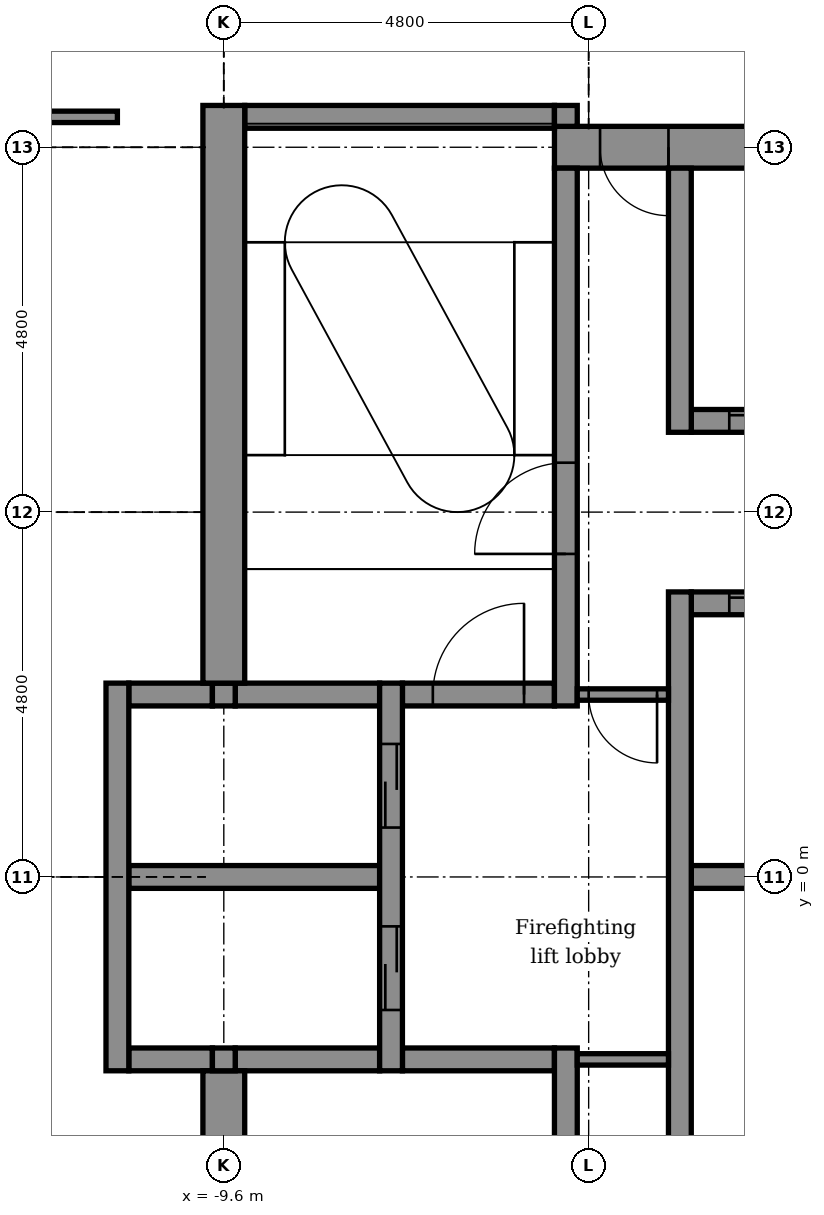
"""IFC4 building model, lengths in metres.
Left out: names, types, materials, properties, quantities, classifications, styles, units other than length and angle.
Written with IfcOpenShell. Run it as: python <this file> out.ifc"""

import sys

from ifc_helpers import new_model, si_unit, direction, frame, frame_2d, origin, place, context, subcontext, project, spatial, rectangle, extrude, element, fill, save


model = new_model("IFC4")
c1 = context("Model", 3, precision=1e-05, world=origin(), true_north=direction((0.0, 1.0)))
c2 = subcontext(c1, "Body", "Model", "MODEL_VIEW")
j1 = project(units=[si_unit("LENGTHUNIT", "METRE"), si_unit("PLANEANGLEUNIT", "RADIAN")], contexts=[c1])
p1 = place(None, origin())
s1 = spatial("IfcSite", under=j1, at=p1, CompositionType="ELEMENT")
p2 = place(p1, origin())
s2 = spatial("IfcBuilding", under=s1, at=p2, CompositionType="ELEMENT")
p3 = place(p2, frame((0.0, 0.0, 226.7)))
s3 = spatial("IfcBuildingStorey", under=s2, at=p3, CompositionType="ELEMENT", Elevation=226.7)
p4 = place(p3, frame((-10.85, -2.4, -0.15), z_axis=(0.0, 0.0, 1.0), x_axis=(1.0, 0.0, 0.0)))
e1 = element("IfcWall", 1, at=p4, inside=s3, PredefinedType="STANDARD", context=c2, shape_type="SweptSolid", body=[
    extrude(rectangle(XDim=1.1, YDim=0.3, at=frame_2d((0.55, 0.0))), origin(), (0.0, 0.0, 1.0), 3.9),
])
p5 = place(p3, frame((-9.45, -2.4, -0.15), z_axis=(0.0, 0.0, 1.0), x_axis=(1.0, 0.0, 0.0)))
e2 = element("IfcWall", 2, at=p5, inside=s3, PredefinedType="STANDARD", context=c2, shape_type="SweptSolid", body=[
    extrude(rectangle(XDim=1.9, YDim=0.3, at=frame_2d((0.95, 0.0))), origin(), (0.0, 0.0, 1.0), 3.9),
])
p6 = place(p3, frame((-7.25, -2.4, -0.15), z_axis=(0.0, 0.0, 1.0), x_axis=(1.0, 0.0, 0.0)))
e3 = element("IfcWall", 3, at=p6, inside=s3, PredefinedType="STANDARD", context=c2, shape_type="SweptSolid", body=[
    extrude(rectangle(XDim=2.0, YDim=0.3, at=frame_2d((1.0, 0.0))), origin(), (0.0, 0.0, 1.0), 3.9),
])
p7 = place(p3, frame((-10.85, 0.0, -0.15), z_axis=(0.0, 0.0, 1.0), x_axis=(1.0, 0.0, 0.0)))
e4 = element("IfcWall", 4, at=p7, inside=s3, PredefinedType="STANDARD", context=c2, shape_type="SweptSolid", body=[
    extrude(rectangle(XDim=3.3, YDim=0.3, at=frame_2d((1.65, 0.0))), origin(), (0.0, 0.0, 1.0), 3.9),
])
p8 = place(p3, frame((-3.45, 0.0, -0.15), z_axis=(0.0, 0.0, 1.0), x_axis=(1.0, 0.0, 0.0)))
e5 = element("IfcWall", 5, at=p8, inside=s3, PredefinedType="STANDARD", context=c2, shape_type="SweptSolid", body=[
    extrude(rectangle(XDim=2.1, YDim=0.3, at=frame_2d((1.05, 0.0))), origin(), (0.0, 0.0, 1.0), 3.9),
])
p9 = place(p3, frame((-10.85, 2.4, -0.15), z_axis=(0.0, 0.0, 1.0), x_axis=(1.0, 0.0, 0.0)))
e6 = element("IfcWall", 6, at=p9, inside=s3, PredefinedType="STANDARD", context=c2, shape_type="SweptSolid", body=[
    extrude(rectangle(XDim=1.1, YDim=0.3, at=frame_2d((0.55, 0.0))), origin(), (0.0, 0.0, 1.0), 3.9),
])
p10 = place(p3, frame((-9.45, 2.4, -0.15), z_axis=(0.0, 0.0, 1.0), x_axis=(1.0, 0.0, 0.0)))
e7 = element("IfcWall", 7, at=p10, inside=s3, PredefinedType="STANDARD", context=c2, shape_type="SweptSolid", body=[
    extrude(rectangle(XDim=1.9, YDim=0.3, at=frame_2d((0.95, 0.0))), origin(), (0.0, 0.0, 1.0), 3.9),
])
p11 = place(p3, frame((-7.25, 2.4, -0.15), z_axis=(0.0, 0.0, 1.0), x_axis=(1.0, 0.0, 0.0)))
e8 = element("IfcWall", 8, at=p11, inside=s3, PredefinedType="STANDARD", context=c2, shape_type="SweptSolid", body=[
    extrude(rectangle(XDim=2.0, YDim=0.3, at=frame_2d((1.0, 0.0))), origin(), (0.0, 0.0, 1.0), 3.9),
])
p12 = place(p11, frame((0.4, 0.0, 0.15)))
e9 = element("IfcOpeningElement", 9, at=p12, cuts=e8, PredefinedType="OPENING", context=c2, shape_type="SweptSolid", body=[
    extrude(rectangle(XDim=1.2, YDim=2.1, at=frame_2d((0.6, 1.05))), frame((0.0, 0.16, 0.0), z_axis=(0.0, -1.0, 0.0), x_axis=(1.0, 0.0, 0.0)), (0.0, 0.0, 1.0), 0.32),
])
p13 = place(p3, frame((-3.45, 3.6, -0.15), z_axis=(0.0, 0.0, 1.0), x_axis=(1.0, 0.0, 0.0)))
e10 = element("IfcWall", 10, at=p13, inside=s3, PredefinedType="STANDARD", context=c2, shape_type="SweptSolid", body=[
    extrude(rectangle(XDim=2.1, YDim=0.3, at=frame_2d((1.05, 0.0))), origin(), (0.0, 0.0, 1.0), 3.9),
])
p14 = place(p13, frame((0.5, 0.0, 0.15)))
e11 = element("IfcOpeningElement", 11, at=p14, cuts=e10, PredefinedType="OPENING", context=c2, shape_type="SweptSolid", body=[
    extrude(rectangle(XDim=1.1, YDim=2.1, at=frame_2d((0.55, 1.05))), frame((0.0, 0.16, 0.0), z_axis=(0.0, -1.0, 0.0), x_axis=(1.0, 0.0, 0.0)), (0.0, 0.0, 1.0), 0.32),
])
p15 = place(p3, frame((-3.45, 6.0, -0.15), z_axis=(0.0, 0.0, 1.0), x_axis=(1.0, 0.0, 0.0)))
e12 = element("IfcWall", 12, at=p15, inside=s3, PredefinedType="STANDARD", context=c2, shape_type="SweptSolid", body=[
    extrude(rectangle(XDim=2.1, YDim=0.3, at=frame_2d((1.05, 0.0))), origin(), (0.0, 0.0, 1.0), 3.9),
])
p16 = place(p15, frame((0.5, 0.0, 0.15)))
e13 = element("IfcOpeningElement", 13, at=p16, cuts=e12, PredefinedType="OPENING", context=c2, shape_type="SweptSolid", body=[
    extrude(rectangle(XDim=1.1, YDim=2.1, at=frame_2d((0.55, 1.05))), frame((0.0, 0.16, 0.0), z_axis=(0.0, -1.0, 0.0), x_axis=(1.0, 0.0, 0.0)), (0.0, 0.0, 1.0), 0.32),
])
p17 = place(p3, frame((-5.25, 9.6, -0.15), z_axis=(0.0, 0.0, 1.0), x_axis=(1.0, 0.0, 0.0)))
e14 = element("IfcWall", 14, at=p17, inside=s3, PredefinedType="SHEAR", context=c2, shape_type="SweptSolid", body=[
    extrude(rectangle(XDim=14.575, YDim=0.55, at=frame_2d((7.288, 0.0))), origin(), (0.0, 0.0, 1.0), 3.9),
])
p18 = place(p17, frame((0.6, 0.0, 0.15)))
e15 = element("IfcOpeningElement", 15, at=p18, cuts=e14, PredefinedType="OPENING", context=c2, shape_type="SweptSolid", body=[
    extrude(rectangle(XDim=0.9, YDim=2.1, at=frame_2d((0.45, 1.05))), frame((0.0, 0.285, 0.0), z_axis=(0.0, -1.0, 0.0), x_axis=(1.0, 0.0, 0.0)), (0.0, 0.0, 1.0), 0.57),
])
p19 = place(p3, frame((-9.325, 10.0, -0.15), z_axis=(0.0, 0.0, 1.0), x_axis=(1.0, 0.0, 0.0)))
e16 = element("IfcWall", 16, at=p19, inside=s3, PredefinedType="STANDARD", context=c2, shape_type="SweptSolid", body=[
    extrude(rectangle(XDim=4.075, YDim=0.3, at=frame_2d((2.038, 0.0))), origin(), (0.0, 0.0, 1.0), 3.9),
])
p20 = place(p3, frame((-11.0, -2.55, -0.15), z_axis=(0.0, 0.0, 1.0), x_axis=(0.0, 1.0, 0.0)))
e17 = element("IfcWall", 17, at=p20, inside=s3, PredefinedType="STANDARD", context=c2, shape_type="SweptSolid", body=[
    extrude(rectangle(XDim=5.1, YDim=0.3, at=frame_2d((2.55, 0.0))), origin(), (0.0, 0.0, 1.0), 3.9),
])
p21 = place(p3, frame((-9.6, -10.15, -0.15), z_axis=(0.0, 0.0, 1.0), x_axis=(0.0, 1.0, 0.0)))
e18 = element("IfcWall", 18, at=p21, inside=s3, PredefinedType="SHEAR", context=c2, shape_type="SweptSolid", body=[
    extrude(rectangle(XDim=7.6, YDim=0.55, at=frame_2d((3.8, 0.0))), origin(), (0.0, 0.0, 1.0), 3.9),
])
for number, where, z_axis, x_axis in (
    (19, (-9.6, -2.55, -0.15), (0.0, 0.0, 1.0), (0.0, 1.0, 0.0)),
    (20, (-9.6, 2.25, -0.15), (0.0, 0.0, 1.0), (0.0, 1.0, 0.0)),
):
    element("IfcWall", number, at=place(p3, frame(where, z_axis=z_axis, x_axis=x_axis)), inside=s3, PredefinedType="STANDARD", context=c2, shape_type="SweptSolid", body=[
        extrude(rectangle(XDim=0.3, YDim=0.3, at=frame_2d((0.15, 0.0))), origin(), (0.0, 0.0, 1.0), 3.9),
    ])
p22 = place(p3, frame((-9.6, 2.55, -0.15), z_axis=(0.0, 0.0, 1.0), x_axis=(0.0, 1.0, 0.0)))
e21 = element("IfcWall", 21, at=p22, inside=s3, PredefinedType="SHEAR", context=c2, shape_type="SweptSolid", body=[
    extrude(rectangle(XDim=7.6, YDim=0.55, at=frame_2d((3.8, 0.0))), origin(), (0.0, 0.0, 1.0), 3.9),
])
p23 = place(p3, frame((-7.4, -2.55, -0.15), z_axis=(0.0, 0.0, 1.0), x_axis=(0.0, 1.0, 0.0)))
e22 = element("IfcWall", 22, at=p23, inside=s3, PredefinedType="STANDARD", context=c2, shape_type="SweptSolid", body=[
    extrude(rectangle(XDim=5.1, YDim=0.3, at=frame_2d((2.55, 0.0))), origin(), (0.0, 0.0, 1.0), 3.9),
])
p24 = place(p23, frame((0.8, 0.0, 0.15)))
e23 = element("IfcOpeningElement", 23, at=p24, cuts=e22, PredefinedType="OPENING", context=c2, shape_type="SweptSolid", body=[
    extrude(rectangle(XDim=1.1, YDim=2.1, at=frame_2d((0.55, 1.05))), frame((0.0, 0.16, 0.0), z_axis=(0.0, -1.0, 0.0), x_axis=(1.0, 0.0, 0.0)), (0.0, 0.0, 1.0), 0.32),
])
p25 = place(p23, frame((3.2, 0.0, 0.15)))
e24 = element("IfcOpeningElement", 24, at=p25, cuts=e22, PredefinedType="OPENING", context=c2, shape_type="SweptSolid", body=[
    extrude(rectangle(XDim=1.1, YDim=2.1, at=frame_2d((0.55, 1.05))), frame((0.0, 0.16, 0.0), z_axis=(0.0, -1.0, 0.0), x_axis=(1.0, 0.0, 0.0)), (0.0, 0.0, 1.0), 0.32),
])
p26 = place(p3, frame((-5.1, -9.325, -0.15), z_axis=(0.0, 0.0, 1.0), x_axis=(0.0, 1.0, 0.0)))
e25 = element("IfcWall", 25, at=p26, inside=s3, PredefinedType="STANDARD", context=c2, shape_type="SweptSolid", body=[
    extrude(rectangle(XDim=7.075, YDim=0.3, at=frame_2d((3.538, 0.0))), origin(), (0.0, 0.0, 1.0), 3.9),
])
p27 = place(p26, frame((3.875, 0.0, 0.15)))
e26 = element("IfcOpeningElement", 26, at=p27, cuts=e25, PredefinedType="OPENING", context=c2, shape_type="SweptSolid", body=[
    extrude(rectangle(XDim=1.2, YDim=2.1, at=frame_2d((0.6, 1.05))), frame((0.0, 0.16, 0.0), z_axis=(0.0, -1.0, 0.0), x_axis=(1.0, 0.0, 0.0)), (0.0, 0.0, 1.0), 0.32),
])
p28 = place(p3, frame((-5.1, 2.25, -0.15), z_axis=(0.0, 0.0, 1.0), x_axis=(0.0, 1.0, 0.0)))
e27 = element("IfcWall", 27, at=p28, inside=s3, PredefinedType="STANDARD", context=c2, shape_type="SweptSolid", body=[
    extrude(rectangle(XDim=7.075, YDim=0.3, at=frame_2d((3.538, 0.0))), origin(), (0.0, 0.0, 1.0), 3.9),
])
p29 = place(p28, frame((2.0, 0.0, 0.15)))
e28 = element("IfcOpeningElement", 28, at=p29, cuts=e27, PredefinedType="OPENING", context=c2, shape_type="SweptSolid", body=[
    extrude(rectangle(XDim=1.2, YDim=2.1, at=frame_2d((0.6, 1.05))), frame((0.0, 0.16, 0.0), z_axis=(0.0, -1.0, 0.0), x_axis=(1.0, 0.0, 0.0)), (0.0, 0.0, 1.0), 0.32),
])
p30 = place(p3, frame((-5.1, 9.875, -0.15), z_axis=(0.0, 0.0, 1.0), x_axis=(0.0, 1.0, 0.0)))
e29 = element("IfcWall", 29, at=p30, inside=s3, PredefinedType="STANDARD", context=c2, shape_type="SweptSolid", body=[
    extrude(rectangle(XDim=0.275, YDim=0.3, at=frame_2d((0.137, 0.0))), origin(), (0.0, 0.0, 1.0), 3.9),
])
p31 = place(p3, frame((-3.6, -3.75, -0.15), z_axis=(0.0, 0.0, 1.0), x_axis=(0.0, 1.0, 0.0)))
e30 = element("IfcWall", 30, at=p31, inside=s3, PredefinedType="STANDARD", context=c2, shape_type="SweptSolid", body=[
    extrude(rectangle(XDim=7.5, YDim=0.3, at=frame_2d((3.75, 0.0))), origin(), (0.0, 0.0, 1.0), 3.9),
])
p32 = place(p3, frame((-3.6, 5.85, -0.15), z_axis=(0.0, 0.0, 1.0), x_axis=(0.0, 1.0, 0.0)))
e31 = element("IfcWall", 31, at=p32, inside=s3, PredefinedType="STANDARD", context=c2, shape_type="SweptSolid", body=[
    extrude(rectangle(XDim=3.475, YDim=0.3, at=frame_2d((1.737, 0.0))), origin(), (0.0, 0.0, 1.0), 3.9),
])
p33 = place(p3, frame((-14.555, 10.0, 0.0), z_axis=(0.0, 0.0, 1.0), x_axis=(1.0, 0.0, 0.0)))
e32 = element("IfcWall", 32, at=p33, inside=s3, PredefinedType="PARTITIONING", context=c2, shape_type="SweptSolid", body=[
    extrude(rectangle(XDim=3.555, YDim=0.15, at=frame_2d((1.777, 0.0))), origin(), (0.0, 0.0, 1.0), 3.75),
])
p34 = place(p3, frame((-4.95, 2.4, 0.0), z_axis=(0.0, 0.0, 1.0), x_axis=(1.0, 0.0, 0.0)))
e33 = element("IfcWall", 33, at=p34, inside=s3, PredefinedType="PARTITIONING", context=c2, shape_type="SweptSolid", body=[
    extrude(rectangle(XDim=1.2, YDim=0.15, at=frame_2d((0.6, 0.0))), origin(), (0.0, 0.0, 1.0), 3.75),
])
p35 = place(p34, frame((0.15, 0.0, 0.0)))
e34 = element("IfcOpeningElement", 34, at=p35, cuts=e33, PredefinedType="OPENING", context=c2, shape_type="SweptSolid", body=[
    extrude(rectangle(XDim=0.9, YDim=2.1, at=frame_2d((0.45, 1.05))), frame((0.0, 0.085, 0.0), z_axis=(0.0, -1.0, 0.0), x_axis=(1.0, 0.0, 0.0)), (0.0, 0.0, 1.0), 0.17),
])
p36 = place(p3, frame((-4.95, -2.4, 0.0), z_axis=(0.0, 0.0, 1.0), x_axis=(1.0, 0.0, 0.0)))
e35 = element("IfcWall", 35, at=p36, inside=s3, PredefinedType="PARTITIONING", context=c2, shape_type="SweptSolid", body=[
    extrude(rectangle(XDim=1.2, YDim=0.15, at=frame_2d((0.6, 0.0))), origin(), (0.0, 0.0, 1.0), 3.75),
])
p37 = place(p24, origin())
e36 = element("IfcDoor", 36, at=p37, inside=s3, OperationType="DOUBLE_DOOR_SLIDING", PredefinedType="DOOR", context=c2, shape_type="SweptSolid", body=[
    extrude(rectangle(XDim=1.1, YDim=2.1, at=frame_2d((0.55, 1.05))), frame((0.0, 0.025, 0.0), z_axis=(0.0, -1.0, 0.0), x_axis=(1.0, 0.0, 0.0)), (0.0, 0.0, 1.0), 0.05),
])
fill(e23, e36)
p38 = place(p25, origin())
e37 = element("IfcDoor", 37, at=p38, inside=s3, OperationType="DOUBLE_DOOR_SLIDING", PredefinedType="DOOR", context=c2, shape_type="SweptSolid", body=[
    extrude(rectangle(XDim=1.1, YDim=2.1, at=frame_2d((0.55, 1.05))), frame((0.0, 0.025, 0.0), z_axis=(0.0, -1.0, 0.0), x_axis=(1.0, 0.0, 0.0)), (0.0, 0.0, 1.0), 0.05),
])
fill(e24, e37)
p39 = place(p16, origin())
e38 = element("IfcDoor", 38, at=p39, inside=s3, OperationType="DOUBLE_DOOR_SLIDING", PredefinedType="DOOR", context=c2, shape_type="SweptSolid", body=[
    extrude(rectangle(XDim=1.1, YDim=2.1, at=frame_2d((0.55, 1.05))), frame((0.0, 0.025, 0.0), z_axis=(0.0, -1.0, 0.0), x_axis=(1.0, 0.0, 0.0)), (0.0, 0.0, 1.0), 0.05),
])
fill(e13, e38)
p40 = place(p14, origin())
e39 = element("IfcDoor", 39, at=p40, inside=s3, OperationType="DOUBLE_DOOR_SLIDING", PredefinedType="DOOR", context=c2, shape_type="SweptSolid", body=[
    extrude(rectangle(XDim=1.1, YDim=2.1, at=frame_2d((0.55, 1.05))), frame((0.0, 0.025, 0.0), z_axis=(0.0, -1.0, 0.0), x_axis=(1.0, 0.0, 0.0)), (0.0, 0.0, 1.0), 0.05),
])
fill(e11, e39)
p41 = place(p29, origin())
e40 = element("IfcDoor", 40, at=p41, inside=s3, OperationType="SINGLE_SWING_LEFT", PredefinedType="DOOR", context=c2, shape_type="SweptSolid", body=[
    extrude(rectangle(XDim=1.2, YDim=2.1, at=frame_2d((0.6, 1.05))), frame((0.0, 0.025, 0.0), z_axis=(0.0, -1.0, 0.0), x_axis=(1.0, 0.0, 0.0)), (0.0, 0.0, 1.0), 0.05),
])
fill(e28, e40)
p42 = place(p18, frame((0.9, 0.0, 0.0), z_axis=(0.0, 0.0, 1.0), x_axis=(-1.0, 0.0, 0.0)))
e41 = element("IfcDoor", 41, at=p42, inside=s3, OperationType="SINGLE_SWING_RIGHT", PredefinedType="DOOR", context=c2, shape_type="SweptSolid", body=[
    extrude(rectangle(XDim=0.9, YDim=2.1, at=frame_2d((0.45, 1.05))), frame((0.0, 0.025, 0.0), z_axis=(0.0, -1.0, 0.0), x_axis=(1.0, 0.0, 0.0)), (0.0, 0.0, 1.0), 0.05),
])
fill(e15, e41)
p43 = place(p35, frame((0.9, 0.0, 0.0), z_axis=(0.0, 0.0, 1.0), x_axis=(-1.0, 0.0, 0.0)))
e42 = element("IfcDoor", 42, at=p43, inside=s3, OperationType="SINGLE_SWING_RIGHT", PredefinedType="DOOR", context=c2, shape_type="SweptSolid", body=[
    extrude(rectangle(XDim=0.9, YDim=2.1, at=frame_2d((0.45, 1.05))), frame((0.0, 0.025, 0.0), z_axis=(0.0, -1.0, 0.0), x_axis=(1.0, 0.0, 0.0)), (0.0, 0.0, 1.0), 0.05),
])
fill(e34, e42)
p44 = place(p12, origin())
e43 = element("IfcDoor", 43, at=p44, inside=s3, OperationType="SINGLE_SWING_RIGHT", PredefinedType="DOOR", context=c2, shape_type="SweptSolid", body=[
    extrude(rectangle(XDim=1.2, YDim=2.1, at=frame_2d((0.6, 1.05))), frame((0.0, 0.025, 0.0), z_axis=(0.0, -1.0, 0.0), x_axis=(1.0, 0.0, 0.0)), (0.0, 0.0, 1.0), 0.05),
])
fill(e9, e43)
save(model, sys.argv[1])
